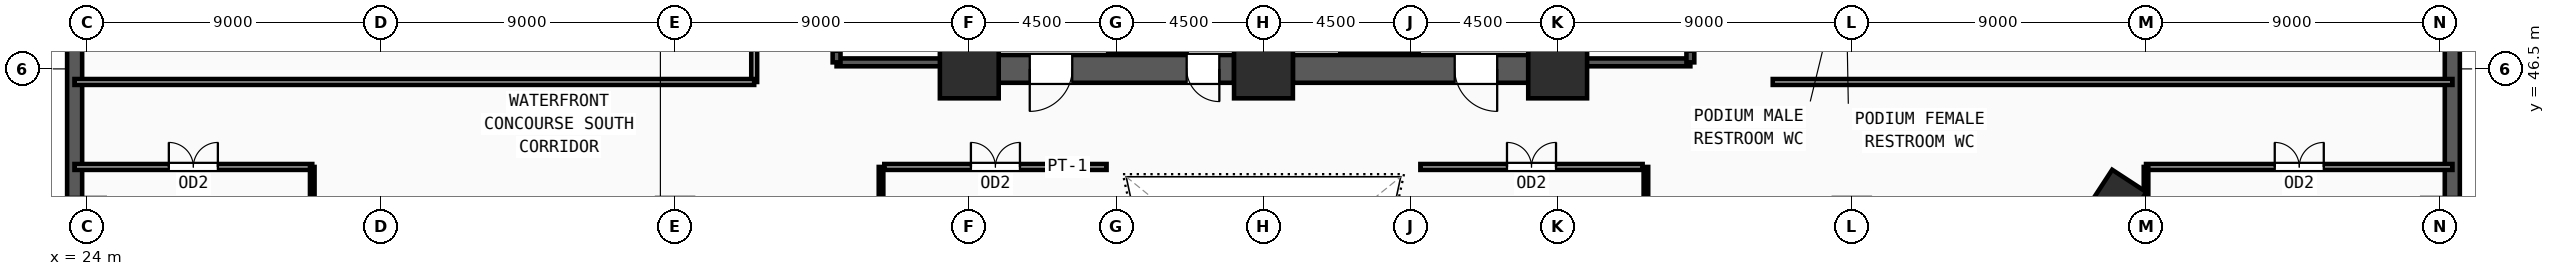
"""IFC4 building model, lengths in metres.
Left out: names, types, materials, properties, quantities, classifications, styles, units other than length and angle.
Written with IfcOpenShell. Run it as: python <this file> out.ifc"""

import sys

from ifc_helpers import new_model, si_unit, direction, frame, frame_2d, origin, origin_2d, place, context, subcontext, project, spatial, rectangle, extrude, source, transform, mapped, element, fill, save


model = new_model("IFC4")
c1 = context("Model", 3, precision=1e-05, world=origin(), true_north=direction((0.0, 1.0)))
c2 = subcontext(c1, "Body", "Model", "MODEL_VIEW")
j1 = project(units=[si_unit("LENGTHUNIT", "METRE"), si_unit("PLANEANGLEUNIT", "RADIAN")], contexts=[c1])
p1 = place(None, origin())
s1 = spatial("IfcSite", under=j1, at=p1, CompositionType="ELEMENT")
p2 = place(p1, origin())
s2 = spatial("IfcBuilding", under=s1, at=p2, CompositionType="ELEMENT")
p3 = place(p2, frame((0.0, 0.0, 23.4)))
s3 = spatial("IfcBuildingStorey", under=s2, at=p3, CompositionType="ELEMENT", Elevation=23.4)
m1 = source(origin(), c2, "Body", "SweptSolid", [
    extrude(rectangle(XDim=1.8, YDim=1.8, at=origin_2d()), origin(), (0.0, 0.0, 1.0), 5.1),
])
for number, where, z_axis, x_axis in (
    (1, (51.0, 46.5, 0.0), (0.0, 0.0, 1.0), (1.0, 0.0, 0.0)),
    (2, (60.0, 46.5, 0.0), (0.0, 0.0, 1.0), (1.0, 0.0, 0.0)),
    (3, (69.0, 46.5, 0.0), (0.0, 0.0, 1.0), (1.0, 0.0, 0.0)),
):
    element("IfcColumn", number, at=place(p3, frame(where, z_axis=z_axis, x_axis=x_axis)), inside=s3, PredefinedType="COLUMN", context=c2, shape_type="MappedRepresentation", body=[
        mapped(m1, transform((0.0, 0.0, 0.0), x_axis=(1.0, 0.0, 0.0), y_axis=(0.0, 1.0, 0.0), z_axis=(0.0, 0.0, 1.0), scale=1.0)),
    ])
m2 = source(origin(), c2, "Body", "SweptSolid", [
    extrude(rectangle(XDim=1.55, YDim=1.25, at=origin_2d()), origin(), (0.0, 0.0, 1.0), 5.1),
])
p4 = place(p3, frame((86.064, 42.423, 0.0), z_axis=(0.0, 0.0, 1.0), x_axis=(0.546978918409, 0.837146380758, 0.0)))
e4 = element("IfcColumn", 4, at=p4, inside=s3, PredefinedType="COLUMN", context=c2, shape_type="MappedRepresentation", body=[
    mapped(m2, transform((0.0, 0.0, 0.0), x_axis=(1.0, 0.0, 0.0), y_axis=(0.0, 1.0, 0.0), z_axis=(0.0, 0.0, 1.0), scale=1.0)),
])
p5 = place(p3, frame((96.37, 24.54, 0.0), z_axis=(0.0, 0.0, 1.0), x_axis=(0.0, 1.0, 0.0)))
e5 = element("IfcWall", 5, at=p5, inside=s3, PredefinedType="SOLIDWALL", context=c2, shape_type="SweptSolid", body=[
    extrude(rectangle(XDim=60.92, YDim=0.46, at=frame_2d((30.46, 0.0))), origin(), (0.0, 0.0, 1.0), 4.82),
])
m3 = source(origin(), c2, "Body", "SweptSolid", [
    extrude(rectangle(XDim=2.7, YDim=2.35, at=frame_2d((1.35, 1.175))), frame((0.0, 0.24, 0.0), z_axis=(0.0, -1.0, 0.0), x_axis=(1.0, 0.0, 0.0)), (0.0, 0.0, 1.0), 0.48),
])
p6 = place(p5, frame((8.803, 0.0, 0.55)))
e6 = element("IfcOpeningElement", 6, at=p6, cuts=e5, PredefinedType="OPENING", context=c2, shape_type="MappedRepresentation", body=[
    mapped(m3, transform((0.0, 0.0, 0.0), x_axis=(1.0, 0.0, 0.0), y_axis=(0.0, 1.0, 0.0), z_axis=(0.0, 0.0, 1.0), scale=1.0)),
])
p7 = place(p5, frame((29.11, 0.0, 0.55)))
e7 = element("IfcOpeningElement", 7, at=p7, cuts=e5, PredefinedType="OPENING", context=c2, shape_type="MappedRepresentation", body=[
    mapped(m3, transform((0.0, 0.0, 0.0), x_axis=(1.0, 0.0, 0.0), y_axis=(0.0, 1.0, 0.0), z_axis=(0.0, 0.0, 1.0), scale=1.0)),
])
p8 = place(p5, frame((39.263, 0.0, 0.55)))
e8 = element("IfcOpeningElement", 8, at=p8, cuts=e5, PredefinedType="OPENING", context=c2, shape_type="MappedRepresentation", body=[
    mapped(m3, transform((0.0, 0.0, 0.0), x_axis=(1.0, 0.0, 0.0), y_axis=(0.0, 1.0, 0.0), z_axis=(0.0, 0.0, 1.0), scale=1.0)),
])
p9 = place(p5, frame((49.417, 0.0, 0.55)))
e9 = element("IfcOpeningElement", 9, at=p9, cuts=e5, PredefinedType="OPENING", context=c2, shape_type="MappedRepresentation", body=[
    mapped(m3, transform((0.0, 0.0, 0.0), x_axis=(1.0, 0.0, 0.0), y_axis=(0.0, 1.0, 0.0), z_axis=(0.0, 0.0, 1.0), scale=1.0)),
])
p10 = place(p3, frame((23.63, 85.46, 0.0), z_axis=(0.0, 0.0, 1.0), x_axis=(0.0, -1.0, 0.0)))
e10 = element("IfcWall", 10, at=p10, inside=s3, PredefinedType="SOLIDWALL", context=c2, shape_type="SweptSolid", body=[
    extrude(rectangle(XDim=60.92, YDim=0.46, at=frame_2d((30.46, 0.0))), origin(), (0.0, 0.0, 1.0), 4.82),
])
p11 = place(p10, frame((8.803, 0.0, 0.55)))
e11 = element("IfcOpeningElement", 11, at=p11, cuts=e10, PredefinedType="OPENING", context=c2, shape_type="MappedRepresentation", body=[
    mapped(m3, transform((0.0, 0.0, 0.0), x_axis=(1.0, 0.0, 0.0), y_axis=(0.0, 1.0, 0.0), z_axis=(0.0, 0.0, 1.0), scale=1.0)),
])
p12 = place(p10, frame((18.957, 0.0, 0.55)))
e12 = element("IfcOpeningElement", 12, at=p12, cuts=e10, PredefinedType="OPENING", context=c2, shape_type="MappedRepresentation", body=[
    mapped(m3, transform((0.0, 0.0, 0.0), x_axis=(1.0, 0.0, 0.0), y_axis=(0.0, 1.0, 0.0), z_axis=(0.0, 0.0, 1.0), scale=1.0)),
])
p13 = place(p10, frame((29.11, 0.0, 0.55)))
e13 = element("IfcOpeningElement", 13, at=p13, cuts=e10, PredefinedType="OPENING", context=c2, shape_type="MappedRepresentation", body=[
    mapped(m3, transform((0.0, 0.0, 0.0), x_axis=(1.0, 0.0, 0.0), y_axis=(0.0, 1.0, 0.0), z_axis=(0.0, 0.0, 1.0), scale=1.0)),
])
p14 = place(p10, frame((49.417, 0.0, 0.55)))
e14 = element("IfcOpeningElement", 14, at=p14, cuts=e10, PredefinedType="OPENING", context=c2, shape_type="MappedRepresentation", body=[
    mapped(m3, transform((0.0, 0.0, 0.0), x_axis=(1.0, 0.0, 0.0), y_axis=(0.0, 1.0, 0.0), z_axis=(0.0, 0.0, 1.0), scale=1.0)),
])
p15 = place(p3, frame((68.1, 46.5, 0.0), z_axis=(0.0, 0.0, 1.0), x_axis=(-1.0, 0.0, 0.0)))
e15 = element("IfcWall", 15, at=p15, inside=s3, PredefinedType="SHEAR", context=c2, shape_type="SweptSolid", body=[
    extrude(rectangle(XDim=7.2, YDim=0.85, at=frame_2d((3.6, 0.0))), origin(), (0.0, 0.0, 1.0), 4.82),
])
m4 = source(origin(), c2, "Body", "SweptSolid", [
    extrude(rectangle(XDim=1.3, YDim=2.2, at=frame_2d((0.65, 1.1))), frame((0.0, 0.435, 0.0), z_axis=(0.0, -1.0, 0.0), x_axis=(1.0, 0.0, 0.0)), (0.0, 0.0, 1.0), 0.87),
])
p16 = place(p15, frame((0.95, 0.0, 0.0)))
e16 = element("IfcOpeningElement", 16, at=p16, cuts=e15, PredefinedType="OPENING", context=c2, shape_type="MappedRepresentation", body=[
    mapped(m4, transform((0.0, 0.0, 0.0), x_axis=(1.0, 0.0, 0.0), y_axis=(0.0, 1.0, 0.0), z_axis=(0.0, 0.0, 1.0), scale=1.0)),
])
p17 = place(p3, frame((59.1, 46.5, 0.0), z_axis=(0.0, 0.0, 1.0), x_axis=(-1.0, 0.0, 0.0)))
e17 = element("IfcWall", 17, at=p17, inside=s3, PredefinedType="SHEAR", context=c2, shape_type="SweptSolid", body=[
    extrude(rectangle(XDim=7.2, YDim=0.85, at=frame_2d((3.6, 0.0))), origin(), (0.0, 0.0, 1.0), 4.82),
])
p18 = place(p17, frame((4.95, 0.0, 0.0)))
e18 = element("IfcOpeningElement", 18, at=p18, cuts=e17, PredefinedType="OPENING", context=c2, shape_type="MappedRepresentation", body=[
    mapped(m4, transform((0.0, 0.0, 0.0), x_axis=(1.0, 0.0, 0.0), y_axis=(0.0, 1.0, 0.0), z_axis=(0.0, 0.0, 1.0), scale=1.0)),
])
m5 = source(origin(), c2, "Body", "SweptSolid", [
    extrude(rectangle(XDim=1.0, YDim=2.2, at=frame_2d((0.5, 1.1))), frame((0.0, 0.435, 0.0), z_axis=(0.0, -1.0, 0.0), x_axis=(1.0, 0.0, 0.0)), (0.0, 0.0, 1.0), 0.87),
])
p19 = place(p17, frame((0.45, 0.0, 0.0)))
e19 = element("IfcOpeningElement", 19, at=p19, cuts=e17, PredefinedType="OPENING", context=c2, shape_type="MappedRepresentation", body=[
    mapped(m5, transform((0.0, 0.0, 0.0), x_axis=(1.0, 0.0, 0.0), y_axis=(0.0, 1.0, 0.0), z_axis=(0.0, 0.0, 1.0), scale=1.0)),
])
p20 = place(p3, frame((46.94, 46.7, 0.0), z_axis=(0.0, 0.0, 1.0), x_axis=(1.0, 0.0, 0.0)))
e20 = element("IfcWall", 20, at=p20, inside=s3, PredefinedType="SOLIDWALL", context=c2, shape_type="SweptSolid", body=[
    extrude(rectangle(XDim=3.44, YDim=0.24, at=frame_2d((1.72, 0.0))), origin(), (0.0, 0.0, 1.0), 4.82),
])
p21 = place(p3, frame((50.38, 46.7, 0.0), z_axis=(0.0, 0.0, 1.0), x_axis=(0.0, 1.0, 0.0)))
e21 = element("IfcWall", 21, at=p21, inside=s3, PredefinedType="SOLIDWALL", context=c2, shape_type="SweptSolid", body=[
    extrude(rectangle(XDim=7.82, YDim=0.24, at=frame_2d((3.91, 0.0))), origin(), (0.0, 0.0, 1.0), 4.82),
])
p22 = place(p3, frame((46.94, 54.52, 0.0), z_axis=(0.0, 0.0, 1.0), x_axis=(0.0, -1.0, 0.0)))
e22 = element("IfcWall", 22, at=p22, inside=s3, PredefinedType="SOLIDWALL", context=c2, shape_type="SweptSolid", body=[
    extrude(rectangle(XDim=7.82, YDim=0.24, at=frame_2d((3.91, 0.0))), origin(), (0.0, 0.0, 1.0), 4.82),
])
m6 = source(origin(), c2, "Body", "SweptSolid", [
    extrude(rectangle(XDim=1.2, YDim=2.2, at=frame_2d((0.6, 1.1))), frame((0.0, 0.13, 0.0), z_axis=(0.0, -1.0, 0.0), x_axis=(1.0, 0.0, 0.0)), (0.0, 0.0, 1.0), 0.26),
])
p23 = place(p22, frame((6.3, 0.0, 0.0)))
e23 = element("IfcOpeningElement", 23, at=p23, cuts=e22, PredefinedType="OPENING", context=c2, shape_type="MappedRepresentation", body=[
    mapped(m6, transform((0.0, 0.0, 0.0), x_axis=(1.0, 0.0, 0.0), y_axis=(0.0, 1.0, 0.0), z_axis=(0.0, 0.0, 1.0), scale=1.0)),
])
p24 = place(p3, frame((69.62, 46.7, 0.0), z_axis=(0.0, 0.0, 1.0), x_axis=(1.0, 0.0, 0.0)))
e24 = element("IfcWall", 24, at=p24, inside=s3, PredefinedType="SOLIDWALL", context=c2, shape_type="SweptSolid", body=[
    extrude(rectangle(XDim=3.44, YDim=0.24, at=frame_2d((1.72, 0.0))), origin(), (0.0, 0.0, 1.0), 3.335),
])
p25 = place(p3, frame((73.06, 46.7, 0.0), z_axis=(0.0, 0.0, 1.0), x_axis=(0.0, 1.0, 0.0)))
e25 = element("IfcWall", 25, at=p25, inside=s3, PredefinedType="SOLIDWALL", context=c2, shape_type="SweptSolid", body=[
    extrude(rectangle(XDim=7.82, YDim=0.24, at=frame_2d((3.91, 0.0))), origin(), (0.0, 0.0, 1.0), 4.82),
])
p26 = place(p25, frame((0.32, 0.0, 0.0)))
e26 = element("IfcOpeningElement", 26, at=p26, cuts=e25, PredefinedType="OPENING", context=c2, shape_type="MappedRepresentation", body=[
    mapped(m6, transform((0.0, 0.0, 0.0), x_axis=(1.0, 0.0, 0.0), y_axis=(0.0, 1.0, 0.0), z_axis=(0.0, 0.0, 1.0), scale=1.0)),
])
p27 = place(p3, frame((69.62, 54.52, 0.0), z_axis=(0.0, 0.0, 1.0), x_axis=(0.0, -1.0, 0.0)))
e27 = element("IfcWall", 27, at=p27, inside=s3, PredefinedType="SOLIDWALL", context=c2, shape_type="SweptSolid", body=[
    extrude(rectangle(XDim=7.82, YDim=0.24, at=frame_2d((3.91, 0.0))), origin(), (0.0, 0.0, 1.0), 4.82),
])
p28 = place(p3, frame((48.4, 43.5, 0.0), z_axis=(0.0, 0.0, 1.0), x_axis=(1.0, 0.0, 0.0)))
e28 = element("IfcWall", 28, at=p28, inside=s3, PredefinedType="PARTITIONING", context=c2, shape_type="SweptSolid", body=[
    extrude(rectangle(XDim=6.8, YDim=0.18, at=frame_2d((3.4, 0.0))), origin(), (0.0, 0.0, 1.0), 4.82),
])
m7 = source(origin(), c2, "Body", "SweptSolid", [
    extrude(rectangle(XDim=1.5, YDim=2.2, at=frame_2d((0.75, 1.1))), frame((0.0, 0.1, 0.0), z_axis=(0.0, -1.0, 0.0), x_axis=(1.0, 0.0, 0.0)), (0.0, 0.0, 1.0), 0.2),
])
p29 = place(p28, frame((2.65, 0.0, 0.0)))
e29 = element("IfcOpeningElement", 29, at=p29, cuts=e28, PredefinedType="OPENING", context=c2, shape_type="MappedRepresentation", body=[
    mapped(m7, transform((0.0, 0.0, 0.0), x_axis=(1.0, 0.0, 0.0), y_axis=(0.0, 1.0, 0.0), z_axis=(0.0, 0.0, 1.0), scale=1.0)),
])
p30 = place(p3, frame((64.8, 43.5, 0.0), z_axis=(0.0, 0.0, 1.0), x_axis=(1.0, 0.0, 0.0)))
e30 = element("IfcWall", 30, at=p30, inside=s3, PredefinedType="PARTITIONING", context=c2, shape_type="SweptSolid", body=[
    extrude(rectangle(XDim=6.8, YDim=0.18, at=frame_2d((3.4, 0.0))), origin(), (0.0, 0.0, 1.0), 4.82),
])
p31 = place(p30, frame((2.65, 0.0, 0.0)))
e31 = element("IfcOpeningElement", 31, at=p31, cuts=e30, PredefinedType="OPENING", context=c2, shape_type="MappedRepresentation", body=[
    mapped(m7, transform((0.0, 0.0, 0.0), x_axis=(1.0, 0.0, 0.0), y_axis=(0.0, 1.0, 0.0), z_axis=(0.0, 0.0, 1.0), scale=1.0)),
])
p32 = place(p3, frame((23.625, 43.5, 0.0), z_axis=(0.0, 0.0, 1.0), x_axis=(1.0, 0.0, 0.0)))
e32 = element("IfcWall", 32, at=p32, inside=s3, PredefinedType="PARTITIONING", context=c2, shape_type="SweptSolid", body=[
    extrude(rectangle(XDim=7.275, YDim=0.18, at=frame_2d((3.637, 0.0))), origin(), (0.0, 0.0, 1.0), 4.82),
])
p33 = place(p32, frame((2.887, 0.0, 0.0)))
e33 = element("IfcOpeningElement", 33, at=p33, cuts=e32, PredefinedType="OPENING", context=c2, shape_type="MappedRepresentation", body=[
    mapped(m7, transform((0.0, 0.0, 0.0), x_axis=(1.0, 0.0, 0.0), y_axis=(0.0, 1.0, 0.0), z_axis=(0.0, 0.0, 1.0), scale=1.0)),
])
p34 = place(p3, frame((87.0, 43.5, 0.0), z_axis=(0.0, 0.0, 1.0), x_axis=(1.0, 0.0, 0.0)))
e34 = element("IfcWall", 34, at=p34, inside=s3, PredefinedType="PARTITIONING", context=c2, shape_type="SweptSolid", body=[
    extrude(rectangle(XDim=9.375, YDim=0.18, at=frame_2d((4.688, 0.0))), origin(), (0.0, 0.0, 1.0), 4.82),
])
p35 = place(p34, frame((3.938, 0.0, 0.0)))
e35 = element("IfcOpeningElement", 35, at=p35, cuts=e34, PredefinedType="OPENING", context=c2, shape_type="MappedRepresentation", body=[
    mapped(m7, transform((0.0, 0.0, 0.0), x_axis=(1.0, 0.0, 0.0), y_axis=(0.0, 1.0, 0.0), z_axis=(0.0, 0.0, 1.0), scale=1.0)),
])
p36 = place(p3, frame((44.42, 46.1, 0.0), z_axis=(0.0, 0.0, 1.0), x_axis=(0.0, 1.0, 0.0)))
e36 = element("IfcWall", 36, at=p36, inside=s3, PredefinedType="PARTITIONING", context=c2, shape_type="SweptSolid", body=[
    extrude(rectangle(XDim=22.0, YDim=0.18, at=frame_2d((11.0, 0.0))), origin(), (0.0, 0.0, 1.0), 4.82),
])
p37 = place(p36, frame((10.25, 0.0, 0.0)))
e37 = element("IfcOpeningElement", 37, at=p37, cuts=e36, PredefinedType="OPENING", context=c2, shape_type="MappedRepresentation", body=[
    mapped(m7, transform((0.0, 0.0, 0.0), x_axis=(1.0, 0.0, 0.0), y_axis=(0.0, 1.0, 0.0), z_axis=(0.0, 0.0, 1.0), scale=1.0)),
])
for number, where, z_axis, x_axis in (
    (38, (23.625, 46.1, 0.0), (0.0, 0.0, 1.0), (1.0, 0.0, 0.0)),
    (39, (75.58, 46.1, 0.0), (0.0, 0.0, 1.0), (1.0, 0.0, 0.0)),
):
    element("IfcWall", number, at=place(p3, frame(where, z_axis=z_axis, x_axis=x_axis)), inside=s3, PredefinedType="PARTITIONING", context=c2, shape_type="SweptSolid", body=[
        extrude(rectangle(XDim=20.795, YDim=0.18, at=frame_2d((10.397, 0.0))), origin(), (0.0, 0.0, 1.0), 4.82),
    ])
for number, where, z_axis, x_axis in (
    (40, (30.9, 23.625, 0.0), (0.0, 0.0, 1.0), (0.0, 1.0, 0.0)),
    (41, (87.0, 23.625, 0.0), (0.0, 0.0, 1.0), (0.0, 1.0, 0.0)),
    (42, (48.3, 23.625, 0.0), (0.0, 0.0, 1.0), (0.0, 1.0, 0.0)),
    (43, (71.7, 23.625, 0.0), (0.0, 0.0, 1.0), (0.0, 1.0, 0.0)),
):
    element("IfcWall", number, at=place(p3, frame(where, z_axis=z_axis, x_axis=x_axis)), inside=s3, PredefinedType="PARTITIONING", context=c2, shape_type="SweptSolid", body=[
        extrude(rectangle(XDim=19.875, YDim=0.14, at=frame_2d((9.938, 0.0))), origin(), (0.0, 0.0, 1.0), 4.82),
    ])
m8 = source(origin(), c2, "Body", "SweptSolid", [
    extrude(rectangle(XDim=1.3, YDim=2.2, at=frame_2d((0.65, 1.1))), frame((0.0, 0.025, 0.0), z_axis=(0.0, -1.0, 0.0), x_axis=(1.0, 0.0, 0.0)), (0.0, 0.0, 1.0), 0.05),
])
p38 = place(p18, origin())
e44 = element("IfcDoor", 44, at=p38, inside=s3, OperationType="SINGLE_SWING_RIGHT", PredefinedType="DOOR", context=c2, shape_type="MappedRepresentation", body=[
    mapped(m8, transform((0.0, 0.0, 0.0), x_axis=(1.0, 0.0, 0.0), y_axis=(0.0, 1.0, 0.0), z_axis=(0.0, 0.0, 1.0), scale=1.0)),
])
fill(e18, e44)
m9 = source(origin(), c2, "Body", "SweptSolid", [
    extrude(rectangle(XDim=1.0, YDim=2.2, at=frame_2d((0.5, 1.1))), frame((0.0, 0.025, 0.0), z_axis=(0.0, -1.0, 0.0), x_axis=(1.0, 0.0, 0.0)), (0.0, 0.0, 1.0), 0.05),
])
p39 = place(p19, origin())
e45 = element("IfcDoor", 45, at=p39, inside=s3, OperationType="SINGLE_SWING_LEFT", PredefinedType="DOOR", context=c2, shape_type="MappedRepresentation", body=[
    mapped(m9, transform((0.0, 0.0, 0.0), x_axis=(1.0, 0.0, 0.0), y_axis=(0.0, 1.0, 0.0), z_axis=(0.0, 0.0, 1.0), scale=1.0)),
])
fill(e19, e45)
p40 = place(p16, origin())
e46 = element("IfcDoor", 46, at=p40, inside=s3, OperationType="SINGLE_SWING_LEFT", PredefinedType="DOOR", context=c2, shape_type="MappedRepresentation", body=[
    mapped(m8, transform((0.0, 0.0, 0.0), x_axis=(1.0, 0.0, 0.0), y_axis=(0.0, 1.0, 0.0), z_axis=(0.0, 0.0, 1.0), scale=1.0)),
])
fill(e16, e46)
m10 = source(origin(), c2, "Body", "SweptSolid", [
    extrude(rectangle(XDim=1.5, YDim=2.2, at=frame_2d((0.75, 1.1))), frame((0.0, 0.025, 0.0), z_axis=(0.0, -1.0, 0.0), x_axis=(1.0, 0.0, 0.0)), (0.0, 0.0, 1.0), 0.05),
])
p41 = place(p29, origin())
e47 = element("IfcDoor", 47, at=p41, inside=s3, OperationType="DOUBLE_DOOR_SINGLE_SWING", PredefinedType="DOOR", context=c2, shape_type="MappedRepresentation", body=[
    mapped(m10, transform((0.0, 0.0, 0.0), x_axis=(1.0, 0.0, 0.0), y_axis=(0.0, 1.0, 0.0), z_axis=(0.0, 0.0, 1.0), scale=1.0)),
])
fill(e29, e47)
p42 = place(p31, origin())
e48 = element("IfcDoor", 48, at=p42, inside=s3, OperationType="DOUBLE_DOOR_SINGLE_SWING", PredefinedType="DOOR", context=c2, shape_type="MappedRepresentation", body=[
    mapped(m10, transform((0.0, 0.0, 0.0), x_axis=(1.0, 0.0, 0.0), y_axis=(0.0, 1.0, 0.0), z_axis=(0.0, 0.0, 1.0), scale=1.0)),
])
fill(e31, e48)
p43 = place(p33, origin())
e49 = element("IfcDoor", 49, at=p43, inside=s3, OperationType="DOUBLE_DOOR_SINGLE_SWING", PredefinedType="DOOR", context=c2, shape_type="MappedRepresentation", body=[
    mapped(m10, transform((0.0, 0.0, 0.0), x_axis=(1.0, 0.0, 0.0), y_axis=(0.0, 1.0, 0.0), z_axis=(0.0, 0.0, 1.0), scale=1.0)),
])
fill(e33, e49)
p44 = place(p35, origin())
e50 = element("IfcDoor", 50, at=p44, inside=s3, OperationType="DOUBLE_DOOR_SINGLE_SWING", PredefinedType="DOOR", context=c2, shape_type="MappedRepresentation", body=[
    mapped(m10, transform((0.0, 0.0, 0.0), x_axis=(1.0, 0.0, 0.0), y_axis=(0.0, 1.0, 0.0), z_axis=(0.0, 0.0, 1.0), scale=1.0)),
])
fill(e35, e50)
save(model, sys.argv[1])
